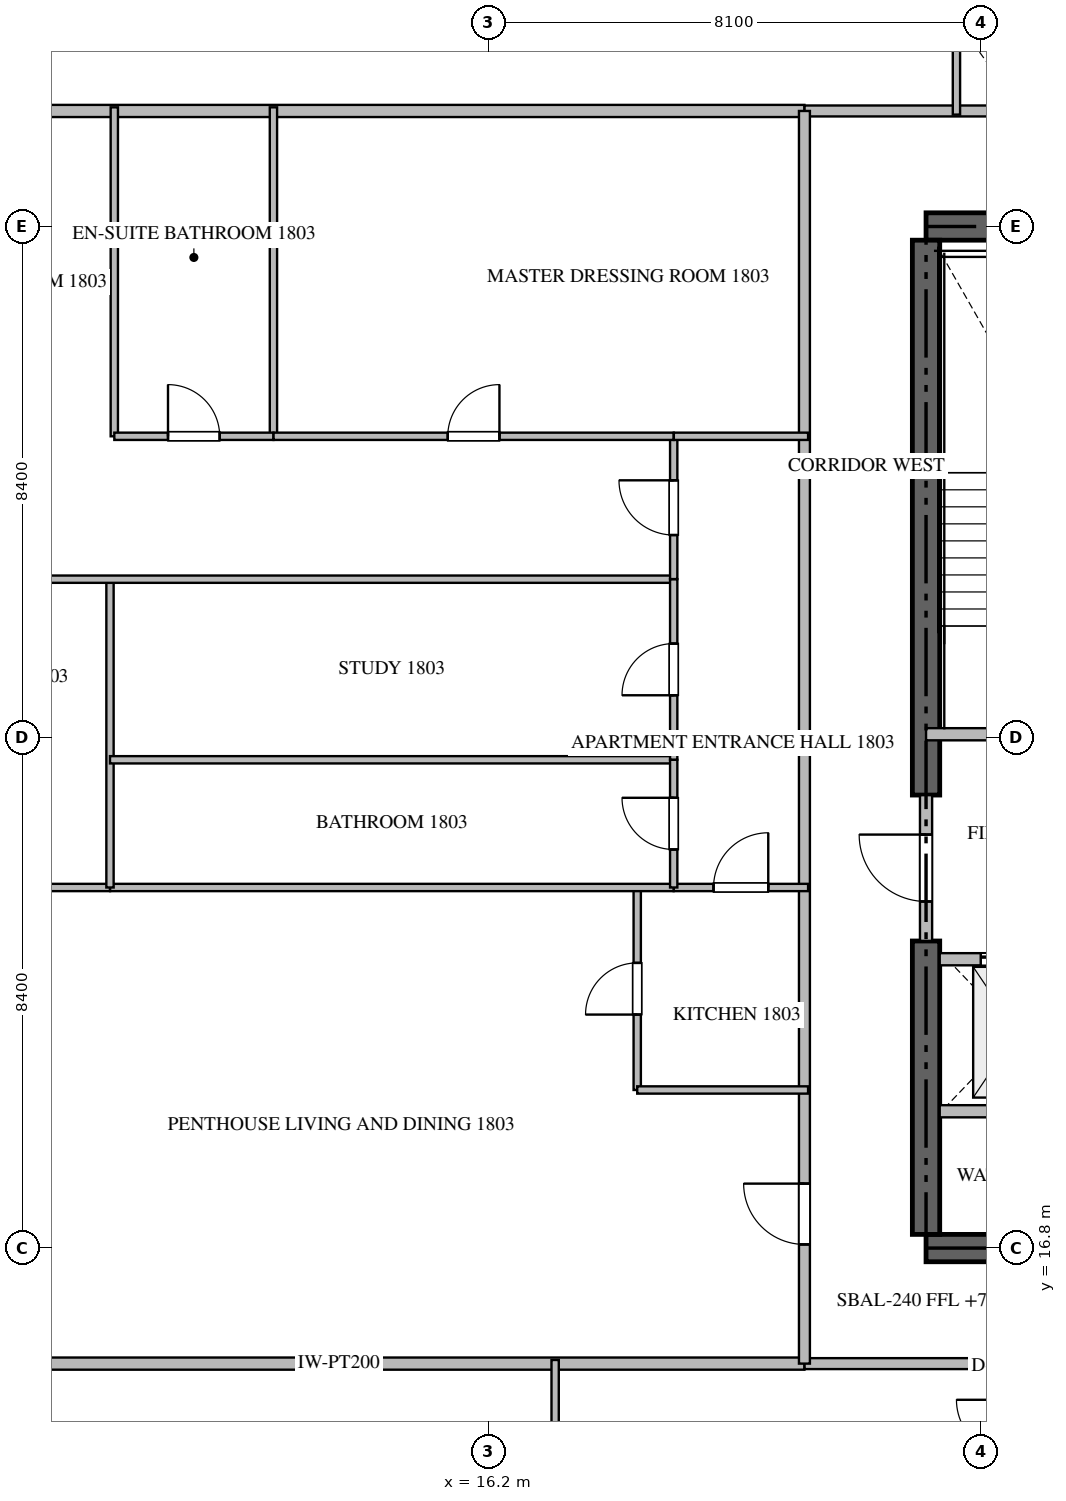
"""IFC4 building model, lengths in metres.
Left out: names, types, materials, properties, quantities, classifications, styles, units other than length and angle.
Written with IfcOpenShell. Run it as: python <this file> out.ifc"""

import sys

from ifc_helpers import new_model, si_unit, direction, frame, frame_2d, origin, place, context, subcontext, project, spatial, rectangle, extrude, source, transform, mapped, element, fill, save


model = new_model("IFC4")
c1 = context("Model", 3, precision=1e-05, world=origin(), true_north=direction((0.0, 1.0)))
c2 = subcontext(c1, "Body", "Model", "MODEL_VIEW")
j1 = project(units=[si_unit("LENGTHUNIT", "METRE"), si_unit("PLANEANGLEUNIT", "RADIAN")], contexts=[c1])
p1 = place(None, origin())
s1 = spatial("IfcSite", under=j1, at=p1, CompositionType="ELEMENT")
p2 = place(p1, origin())
s2 = spatial("IfcBuilding", under=s1, at=p2, CompositionType="ELEMENT")
p3 = place(p2, frame((0.0, 0.0, 75.45)))
s3 = spatial("IfcBuildingStorey", under=s2, at=p3, CompositionType="ELEMENT", Elevation=75.45)
for number, where, z_axis, x_axis in (
    (1, (23.4, 16.8, -0.26), (0.0, 0.0, 1.0), (1.0, 0.0, 0.0)),
    (2, (41.4, 33.6, -0.26), (0.0, 0.0, 1.0), (-1.0, 0.0, 0.0)),
):
    element("IfcWall", number, at=place(p3, frame(where, z_axis=z_axis, x_axis=x_axis)), inside=s3, PredefinedType="SHEAR", context=c2, shape_type="SweptSolid", body=[
        extrude(rectangle(XDim=18.0, YDim=0.45, at=frame_2d((9.0, 0.0))), origin(), (0.0, 0.0, 1.0), 3.748),
    ])
p4 = place(p3, frame((23.4, 17.025, -0.26), z_axis=(0.0, 0.0, 1.0), x_axis=(0.0, 1.0, 0.0)))
e3 = element("IfcWall", 3, at=p4, inside=s3, PredefinedType="SHEAR", context=c2, shape_type="SweptSolid", body=[
    extrude(rectangle(XDim=4.825, YDim=0.45, at=frame_2d((2.413, 0.0))), origin(), (0.0, 0.0, 1.0), 3.748),
])
p5 = place(p3, frame((23.4, 24.25, -0.26), z_axis=(0.0, 0.0, 1.0), x_axis=(0.0, 1.0, 0.0)))
e4 = element("IfcWall", 4, at=p5, inside=s3, PredefinedType="SHEAR", context=c2, shape_type="SweptSolid", body=[
    extrude(rectangle(XDim=9.125, YDim=0.45, at=frame_2d((4.562, 0.0))), origin(), (0.0, 0.0, 1.0), 3.748),
])
p6 = place(p3, frame((23.4, 25.25, 0.0), z_axis=(0.0, 0.0, 1.0), x_axis=(1.0, 0.0, 0.0)))
e5 = element("IfcWall", 5, at=p6, inside=s3, PredefinedType="STANDARD", context=c2, shape_type="SweptSolid", body=[
    extrude(rectangle(XDim=4.45, YDim=0.2, at=frame_2d((2.225, 0.0))), origin(), (0.0, 0.0, 1.0), 3.49),
])
p7 = place(p6, frame((1.65, 0.0, 0.0)))
e6 = element("IfcOpeningElement", 6, at=p7, cuts=e5, PredefinedType="OPENING", context=c2, shape_type="SweptSolid", body=[
    extrude(rectangle(XDim=1.1, YDim=2.15, at=frame_2d((0.55, 1.075))), frame((0.0, 0.11, 0.0), z_axis=(0.0, -1.0, 0.0), x_axis=(1.0, 0.0, 0.0)), (0.0, 0.0, 1.0), 0.22),
])
p8 = place(p3, frame((23.625, 21.55, 0.0), z_axis=(0.0, 0.0, 1.0), x_axis=(1.0, 0.0, 0.0)))
e7 = element("IfcWall", 7, at=p8, inside=s3, PredefinedType="STANDARD", context=c2, shape_type="SweptSolid", body=[
    extrude(rectangle(XDim=2.425, YDim=0.2, at=frame_2d((1.212, 0.0))), origin(), (0.0, 0.0, 1.0), 3.49),
])
p9 = place(p8, frame((0.675, 0.0, 0.0)))
e8 = element("IfcOpeningElement", 8, at=p9, cuts=e7, PredefinedType="OPENING", context=c2, shape_type="SweptSolid", body=[
    extrude(rectangle(XDim=1.2, YDim=2.2, at=frame_2d((0.6, 1.1))), frame((0.0, 0.11, 0.0), z_axis=(0.0, -1.0, 0.0), x_axis=(1.0, 0.0, 0.0)), (0.0, 0.0, 1.0), 0.22),
])
p10 = place(p3, frame((23.625, 19.05, 0.0), z_axis=(0.0, 0.0, 1.0), x_axis=(1.0, 0.0, 0.0)))
e9 = element("IfcWall", 9, at=p10, inside=s3, PredefinedType="STANDARD", context=c2, shape_type="SweptSolid", body=[
    extrude(rectangle(XDim=2.425, YDim=0.2, at=frame_2d((1.212, 0.0))), origin(), (0.0, 0.0, 1.0), 3.49),
])
p11 = place(p3, frame((23.4, 21.852, 0.0), z_axis=(0.0, 0.0, 1.0), x_axis=(0.0, 1.0, 0.0)))
e10 = element("IfcWall", 10, at=p11, inside=s3, PredefinedType="STANDARD", context=c2, shape_type="SweptSolid", body=[
    extrude(rectangle(XDim=2.396, YDim=0.2, at=frame_2d((1.198, 0.0))), origin(), (0.0, 0.0, 1.0), 3.49),
])
p12 = place(p11, frame((0.648, 0.0, 0.0)))
e11 = element("IfcOpeningElement", 11, at=p12, cuts=e10, PredefinedType="OPENING", context=c2, shape_type="SweptSolid", body=[
    extrude(rectangle(XDim=1.1, YDim=2.15, at=frame_2d((0.55, 1.075))), frame((0.0, 0.11, 0.0), z_axis=(0.0, -1.0, 0.0), x_axis=(1.0, 0.0, 0.0)), (0.0, 0.0, 1.0), 0.22),
])
for number, where, z_axis, x_axis in (
    (12, (6.082, 14.9, 0.0), (0.0, 0.0, 1.0), (1.0, 0.0, 0.0)),
    (13, (6.082, 35.5, 0.0), (0.0, 0.0, 1.0), (1.0, 0.0, 0.0)),
):
    element("IfcWall", number, at=place(p3, frame(where, z_axis=z_axis, x_axis=x_axis)), inside=s3, PredefinedType="PARTITIONING", context=c2, shape_type="SweptSolid", body=[
        extrude(rectangle(XDim=15.318, YDim=0.2, at=frame_2d((7.659, 0.0))), origin(), (0.0, 0.0, 1.0), 3.49),
    ])
p13 = place(p3, frame((21.402, 14.9, 0.0), z_axis=(0.0, 0.0, 1.0), x_axis=(1.0, 0.0, 0.0)))
e14 = element("IfcWall", 14, at=p13, inside=s3, PredefinedType="PARTITIONING", context=c2, shape_type="SweptSolid", body=[
    extrude(rectangle(XDim=21.996, YDim=0.18, at=frame_2d((10.998, 0.0))), origin(), (0.0, 0.0, 1.0), 3.49),
])
p14 = place(p13, frame((7.202, 0.0, 0.0)))
e15 = element("IfcOpeningElement", 15, at=p14, cuts=e14, PredefinedType="OPENING", context=c2, shape_type="SweptSolid", body=[
    extrude(rectangle(XDim=1.0, YDim=2.15, at=frame_2d((0.5, 1.075))), frame((0.0, 0.1, 0.0), z_axis=(0.0, -1.0, 0.0), x_axis=(1.0, 0.0, 0.0)), (0.0, 0.0, 1.0), 0.2),
])
p15 = place(p3, frame((21.402, 35.5, 0.0), z_axis=(0.0, 0.0, 1.0), x_axis=(1.0, 0.0, 0.0)))
e16 = element("IfcWall", 16, at=p15, inside=s3, PredefinedType="PARTITIONING", context=c2, shape_type="SweptSolid", body=[
    extrude(rectangle(XDim=21.996, YDim=0.18, at=frame_2d((10.998, 0.0))), origin(), (0.0, 0.0, 1.0), 3.49),
])
p16 = place(p15, frame((15.222, 0.0, 0.0)))
e17 = element("IfcOpeningElement", 17, at=p16, cuts=e16, PredefinedType="OPENING", context=c2, shape_type="SweptSolid", body=[
    extrude(rectangle(XDim=1.0, YDim=2.15, at=frame_2d((0.5, 1.075))), frame((0.0, 0.1, 0.0), z_axis=(0.0, -1.0, 0.0), x_axis=(1.0, 0.0, 0.0)), (0.0, 0.0, 1.0), 0.2),
])
p17 = place(p3, frame((21.4, 14.9, 0.0), z_axis=(0.0, 0.0, 1.0), x_axis=(0.0, 1.0, 0.0)))
e18 = element("IfcWall", 18, at=p17, inside=s3, PredefinedType="PARTITIONING", context=c2, shape_type="SweptSolid", body=[
    extrude(rectangle(XDim=20.6, YDim=0.18, at=frame_2d((10.3, 0.0))), origin(), (0.0, 0.0, 1.0), 3.49),
])
p18 = place(p17, frame((1.96, 0.0, 0.0)))
e19 = element("IfcOpeningElement", 19, at=p18, cuts=e18, PredefinedType="OPENING", context=c2, shape_type="SweptSolid", body=[
    extrude(rectangle(XDim=1.0, YDim=2.15, at=frame_2d((0.5, 1.075))), frame((0.0, 0.1, 0.0), z_axis=(0.0, -1.0, 0.0), x_axis=(1.0, 0.0, 0.0)), (0.0, 0.0, 1.0), 0.2),
])
for number, where, z_axis, x_axis in (
    (20, (17.3, 12.752, 0.0), (0.0, 0.0, 1.0), (0.0, 1.0, 0.0)),
    (21, (23.9, 37.648, 0.0), (0.0, 0.0, 1.0), (0.0, -1.0, 0.0)),
):
    element("IfcWall", number, at=place(p3, frame(where, z_axis=z_axis, x_axis=x_axis)), inside=s3, PredefinedType="PARTITIONING", context=c2, shape_type="SweptSolid", body=[
        extrude(rectangle(XDim=2.208, YDim=0.12, at=frame_2d((1.104, 0.0))), origin(), (0.0, 0.0, 1.0), 3.49),
    ])
p19 = place(p3, frame((18.65, 19.4, 0.0), z_axis=(0.0, 0.0, 1.0), x_axis=(0.0, 1.0, 0.0)))
e22 = element("IfcWall", 22, at=p19, inside=s3, PredefinedType="PARTITIONING", context=c2, shape_type="SweptSolid", body=[
    extrude(rectangle(XDim=3.33, YDim=0.12, at=frame_2d((1.665, 0.0))), origin(), (0.0, 0.0, 1.0), 3.49),
])
p20 = place(p19, frame((1.24, 0.0, 0.0)))
e23 = element("IfcOpeningElement", 23, at=p20, cuts=e22, PredefinedType="OPENING", context=c2, shape_type="SweptSolid", body=[
    extrude(rectangle(XDim=0.85, YDim=2.1, at=frame_2d((0.425, 1.05))), frame((0.0, 0.07, 0.0), z_axis=(0.0, -1.0, 0.0), x_axis=(1.0, 0.0, 0.0)), (0.0, 0.0, 1.0), 0.14),
])
p21 = place(p3, frame((18.65, 19.4, 0.0), z_axis=(0.0, 0.0, 1.0), x_axis=(1.0, 0.0, 0.0)))
e24 = element("IfcWall", 24, at=p21, inside=s3, PredefinedType="PARTITIONING", context=c2, shape_type="SweptSolid", body=[
    extrude(rectangle(XDim=2.81, YDim=0.12, at=frame_2d((1.405, 0.0))), origin(), (0.0, 0.0, 1.0), 3.49),
])
p22 = place(p3, frame((19.25, 22.73, 0.0), z_axis=(0.0, 0.0, 1.0), x_axis=(1.0, 0.0, 0.0)))
e25 = element("IfcWall", 25, at=p22, inside=s3, PredefinedType="PARTITIONING", context=c2, shape_type="SweptSolid", body=[
    extrude(rectangle(XDim=2.21, YDim=0.12, at=frame_2d((1.105, 0.0))), origin(), (0.0, 0.0, 1.0), 3.49),
])
p23 = place(p22, frame((0.655, 0.0, 0.0)))
e26 = element("IfcOpeningElement", 26, at=p23, cuts=e25, PredefinedType="OPENING", context=c2, shape_type="SweptSolid", body=[
    extrude(rectangle(XDim=0.9, YDim=2.1, at=frame_2d((0.45, 1.05))), frame((0.0, 0.07, 0.0), z_axis=(0.0, -1.0, 0.0), x_axis=(1.0, 0.0, 0.0)), (0.0, 0.0, 1.0), 0.14),
])
p24 = place(p3, frame((6.095, 22.73, 0.0), z_axis=(0.0, 0.0, 1.0), x_axis=(1.0, 0.0, 0.0)))
e27 = element("IfcWall", 27, at=p24, inside=s3, PredefinedType="PARTITIONING", context=c2, shape_type="SweptSolid", body=[
    extrude(rectangle(XDim=3.884, YDim=0.12, at=frame_2d((1.942, 0.0))), origin(), (0.0, 0.0, 1.0), 3.49),
])
p25 = place(p24, frame((1.781, 0.0, 0.0)))
e28 = element("IfcOpeningElement", 28, at=p25, cuts=e27, PredefinedType="OPENING", context=c2, shape_type="SweptSolid", body=[
    extrude(rectangle(XDim=0.9, YDim=2.1, at=frame_2d((0.45, 1.05))), frame((0.0, 0.07, 0.0), z_axis=(0.0, -1.0, 0.0), x_axis=(1.0, 0.0, 0.0)), (0.0, 0.0, 1.0), 0.14),
])
p26 = place(p3, frame((9.981, 22.73, 0.0), z_axis=(0.0, 0.0, 1.0), x_axis=(1.0, 0.0, 0.0)))
e29 = element("IfcWall", 29, at=p26, inside=s3, PredefinedType="PARTITIONING", context=c2, shape_type="SweptSolid", body=[
    extrude(rectangle(XDim=9.267, YDim=0.12, at=frame_2d((4.634, 0.0))), origin(), (0.0, 0.0, 1.0), 3.49),
])
p27 = place(p3, frame((9.979, 22.73, 0.0), z_axis=(0.0, 0.0, 1.0), x_axis=(0.0, 1.0, 0.0)))
e30 = element("IfcWall", 30, at=p27, inside=s3, PredefinedType="PARTITIONING", context=c2, shape_type="SweptSolid", body=[
    extrude(rectangle(XDim=5.07, YDim=0.12, at=frame_2d((2.535, 0.0))), origin(), (0.0, 0.0, 1.0), 3.49),
])
p28 = place(p3, frame((6.095, 27.8, 0.0), z_axis=(0.0, 0.0, 1.0), x_axis=(1.0, 0.0, 0.0)))
e31 = element("IfcWall", 31, at=p28, inside=s3, PredefinedType="PARTITIONING", context=c2, shape_type="SweptSolid", body=[
    extrude(rectangle(XDim=13.155, YDim=0.12, at=frame_2d((6.578, 0.0))), origin(), (0.0, 0.0, 1.0), 3.49),
])
p29 = place(p3, frame((9.979, 24.83, 0.0), z_axis=(0.0, 0.0, 1.0), x_axis=(1.0, 0.0, 0.0)))
e32 = element("IfcWall", 32, at=p29, inside=s3, PredefinedType="PARTITIONING", context=c2, shape_type="SweptSolid", body=[
    extrude(rectangle(XDim=9.271, YDim=0.12, at=frame_2d((4.635, 0.0))), origin(), (0.0, 0.0, 1.0), 3.49),
])
p30 = place(p3, frame((19.25, 22.73, 0.0), z_axis=(0.0, 0.0, 1.0), x_axis=(0.0, 1.0, 0.0)))
e33 = element("IfcWall", 33, at=p30, inside=s3, PredefinedType="PARTITIONING", context=c2, shape_type="SweptSolid", body=[
    extrude(rectangle(XDim=2.1, YDim=0.12, at=frame_2d((1.05, 0.0))), origin(), (0.0, 0.0, 1.0), 3.49),
])
p31 = place(p30, frame((0.625, 0.0, 0.0)))
e34 = element("IfcOpeningElement", 34, at=p31, cuts=e33, PredefinedType="OPENING", context=c2, shape_type="SweptSolid", body=[
    extrude(rectangle(XDim=0.85, YDim=2.1, at=frame_2d((0.425, 1.05))), frame((0.0, 0.07, 0.0), z_axis=(0.0, -1.0, 0.0), x_axis=(1.0, 0.0, 0.0)), (0.0, 0.0, 1.0), 0.14),
])
p32 = place(p3, frame((19.25, 24.832, 0.0), z_axis=(0.0, 0.0, 1.0), x_axis=(0.0, 1.0, 0.0)))
e35 = element("IfcWall", 35, at=p32, inside=s3, PredefinedType="PARTITIONING", context=c2, shape_type="SweptSolid", body=[
    extrude(rectangle(XDim=2.968, YDim=0.12, at=frame_2d((1.484, 0.0))), origin(), (0.0, 0.0, 1.0), 3.49),
])
p33 = place(p32, frame((1.059, 0.0, 0.0)))
e36 = element("IfcOpeningElement", 36, at=p33, cuts=e35, PredefinedType="OPENING", context=c2, shape_type="SweptSolid", body=[
    extrude(rectangle(XDim=0.85, YDim=2.1, at=frame_2d((0.425, 1.05))), frame((0.0, 0.07, 0.0), z_axis=(0.0, -1.0, 0.0), x_axis=(1.0, 0.0, 0.0)), (0.0, 0.0, 1.0), 0.14),
])
p34 = place(p3, frame((19.25, 27.802, 0.0), z_axis=(0.0, 0.0, 1.0), x_axis=(0.0, 1.0, 0.0)))
e37 = element("IfcWall", 37, at=p34, inside=s3, PredefinedType="PARTITIONING", context=c2, shape_type="SweptSolid", body=[
    extrude(rectangle(XDim=2.348, YDim=0.12, at=frame_2d((1.174, 0.0))), origin(), (0.0, 0.0, 1.0), 3.49),
])
p35 = place(p34, frame((0.724, 0.0, 0.0)))
e38 = element("IfcOpeningElement", 38, at=p35, cuts=e37, PredefinedType="OPENING", context=c2, shape_type="SweptSolid", body=[
    extrude(rectangle(XDim=0.9, YDim=2.1, at=frame_2d((0.45, 1.05))), frame((0.0, 0.07, 0.0), z_axis=(0.0, -1.0, 0.0), x_axis=(1.0, 0.0, 0.0)), (0.0, 0.0, 1.0), 0.14),
])
for number, where, z_axis, x_axis in (
    (39, (10.05, 30.15, 0.0), (0.0, 0.0, 1.0), (0.0, 1.0, 0.0)),
    (40, (12.667, 30.15, 0.0), (0.0, 0.0, 1.0), (0.0, 1.0, 0.0)),
):
    element("IfcWall", number, at=place(p3, frame(where, z_axis=z_axis, x_axis=x_axis)), inside=s3, PredefinedType="PARTITIONING", context=c2, shape_type="SweptSolid", body=[
        extrude(rectangle(XDim=5.41, YDim=0.12, at=frame_2d((2.705, 0.0))), origin(), (0.0, 0.0, 1.0), 3.49),
    ])
p36 = place(p3, frame((10.05, 30.15, 0.0), z_axis=(0.0, 0.0, 1.0), x_axis=(1.0, 0.0, 0.0)))
e41 = element("IfcWall", 41, at=p36, inside=s3, PredefinedType="PARTITIONING", context=c2, shape_type="SweptSolid", body=[
    extrude(rectangle(XDim=2.617, YDim=0.12, at=frame_2d((1.309, 0.0))), origin(), (0.0, 0.0, 1.0), 3.49),
])
p37 = place(p36, frame((0.883, 0.0, 0.0)))
e42 = element("IfcOpeningElement", 42, at=p37, cuts=e41, PredefinedType="OPENING", context=c2, shape_type="SweptSolid", body=[
    extrude(rectangle(XDim=0.85, YDim=2.1, at=frame_2d((0.425, 1.05))), frame((0.0, 0.07, 0.0), z_axis=(0.0, -1.0, 0.0), x_axis=(1.0, 0.0, 0.0)), (0.0, 0.0, 1.0), 0.14),
])
p38 = place(p3, frame((12.669, 30.15, 0.0), z_axis=(0.0, 0.0, 1.0), x_axis=(1.0, 0.0, 0.0)))
e43 = element("IfcWall", 43, at=p38, inside=s3, PredefinedType="PARTITIONING", context=c2, shape_type="SweptSolid", body=[
    extrude(rectangle(XDim=6.581, YDim=0.12, at=frame_2d((3.291, 0.0))), origin(), (0.0, 0.0, 1.0), 3.49),
])
p39 = place(p38, frame((2.865, 0.0, 0.0)))
e44 = element("IfcOpeningElement", 44, at=p39, cuts=e43, PredefinedType="OPENING", context=c2, shape_type="SweptSolid", body=[
    extrude(rectangle(XDim=0.85, YDim=2.1, at=frame_2d((0.425, 1.05))), frame((0.0, 0.07, 0.0), z_axis=(0.0, -1.0, 0.0), x_axis=(1.0, 0.0, 0.0)), (0.0, 0.0, 1.0), 0.14),
])
p40 = place(p3, frame((19.252, 30.15, 0.0), z_axis=(0.0, 0.0, 1.0), x_axis=(1.0, 0.0, 0.0)))
e45 = element("IfcWall", 45, at=p40, inside=s3, PredefinedType="PARTITIONING", context=c2, shape_type="SweptSolid", body=[
    extrude(rectangle(XDim=2.208, YDim=0.12, at=frame_2d((1.104, 0.0))), origin(), (0.0, 0.0, 1.0), 3.49),
])
m1 = source(origin(), c2, "Body", "SweptSolid", [
    extrude(rectangle(XDim=1.2, YDim=2.2, at=frame_2d((0.6, 1.1))), frame((0.0, 0.025, 0.0), z_axis=(0.0, -1.0, 0.0), x_axis=(1.0, 0.0, 0.0)), (0.0, 0.0, 1.0), 0.05),
])
p41 = place(p9, origin())
e46 = element("IfcDoor", 46, at=p41, inside=s3, OperationType="DOUBLE_DOOR_SLIDING", PredefinedType="DOOR", context=c2, shape_type="MappedRepresentation", body=[
    mapped(m1, transform((0.0, 0.0, 0.0), scale=1.0)),
])
fill(e8, e46)
m2 = source(origin(), c2, "Body", "SweptSolid", [
    extrude(rectangle(XDim=1.1, YDim=2.15, at=frame_2d((0.55, 1.075))), frame((0.0, 0.025, 0.0), z_axis=(0.0, -1.0, 0.0), x_axis=(1.0, 0.0, 0.0)), (0.0, 0.0, 1.0), 0.05),
])
p42 = place(p12, origin())
e47 = element("IfcDoor", 47, at=p42, inside=s3, OperationType="SINGLE_SWING_RIGHT", PredefinedType="DOOR", context=c2, shape_type="MappedRepresentation", body=[
    mapped(m2, transform((0.0, 0.0, 0.0), scale=1.0)),
])
fill(e11, e47)
m3 = source(origin(), c2, "Body", "SweptSolid", [
    extrude(rectangle(XDim=1.0, YDim=2.15, at=frame_2d((0.5, 1.075))), frame((0.0, 0.025, 0.0), z_axis=(0.0, -1.0, 0.0), x_axis=(1.0, 0.0, 0.0)), (0.0, 0.0, 1.0), 0.05),
])
p43 = place(p18, origin())
e48 = element("IfcDoor", 48, at=p43, inside=s3, OperationType="SINGLE_SWING_RIGHT", PredefinedType="DOOR", context=c2, shape_type="MappedRepresentation", body=[
    mapped(m3, transform((0.0, 0.0, 0.0), scale=1.0)),
])
fill(e19, e48)
m4 = source(origin(), c2, "Body", "SweptSolid", [
    extrude(rectangle(XDim=0.85, YDim=2.1, at=frame_2d((0.425, 1.05))), frame((0.0, 0.025, 0.0), z_axis=(0.0, -1.0, 0.0), x_axis=(1.0, 0.0, 0.0)), (0.0, 0.0, 1.0), 0.05),
])
p44 = place(p20, origin())
e49 = element("IfcDoor", 49, at=p44, inside=s3, OperationType="SINGLE_SWING_LEFT", PredefinedType="DOOR", context=c2, shape_type="MappedRepresentation", body=[
    mapped(m4, transform((0.0, 0.0, 0.0), scale=1.0)),
])
fill(e23, e49)
m5 = source(origin(), c2, "Body", "SweptSolid", [
    extrude(rectangle(XDim=0.9, YDim=2.1, at=frame_2d((0.45, 1.05))), frame((0.0, 0.025, 0.0), z_axis=(0.0, -1.0, 0.0), x_axis=(1.0, 0.0, 0.0)), (0.0, 0.0, 1.0), 0.05),
])
p45 = place(p23, origin())
e50 = element("IfcDoor", 50, at=p45, inside=s3, OperationType="SINGLE_SWING_RIGHT", PredefinedType="DOOR", context=c2, shape_type="MappedRepresentation", body=[
    mapped(m5, transform((0.0, 0.0, 0.0), scale=1.0)),
])
fill(e26, e50)
p46 = place(p31, origin())
e51 = element("IfcDoor", 51, at=p46, inside=s3, OperationType="SINGLE_SWING_RIGHT", PredefinedType="DOOR", context=c2, shape_type="MappedRepresentation", body=[
    mapped(m4, transform((0.0, 0.0, 0.0), scale=1.0)),
])
fill(e34, e51)
p47 = place(p33, origin())
e52 = element("IfcDoor", 52, at=p47, inside=s3, OperationType="SINGLE_SWING_LEFT", PredefinedType="DOOR", context=c2, shape_type="MappedRepresentation", body=[
    mapped(m4, transform((0.0, 0.0, 0.0), scale=1.0)),
])
fill(e36, e52)
p48 = place(p35, origin())
e53 = element("IfcDoor", 53, at=p48, inside=s3, OperationType="SINGLE_SWING_RIGHT", PredefinedType="DOOR", context=c2, shape_type="MappedRepresentation", body=[
    mapped(m5, transform((0.0, 0.0, 0.0), scale=1.0)),
])
fill(e38, e53)
p49 = place(p37, origin())
e54 = element("IfcDoor", 54, at=p49, inside=s3, OperationType="SINGLE_SWING_LEFT", PredefinedType="DOOR", context=c2, shape_type="MappedRepresentation", body=[
    mapped(m4, transform((0.0, 0.0, 0.0), scale=1.0)),
])
fill(e42, e54)
p50 = place(p39, origin())
e55 = element("IfcDoor", 55, at=p50, inside=s3, OperationType="SINGLE_SWING_RIGHT", PredefinedType="DOOR", context=c2, shape_type="MappedRepresentation", body=[
    mapped(m4, transform((0.0, 0.0, 0.0), scale=1.0)),
])
fill(e44, e55)
save(model, sys.argv[1])
